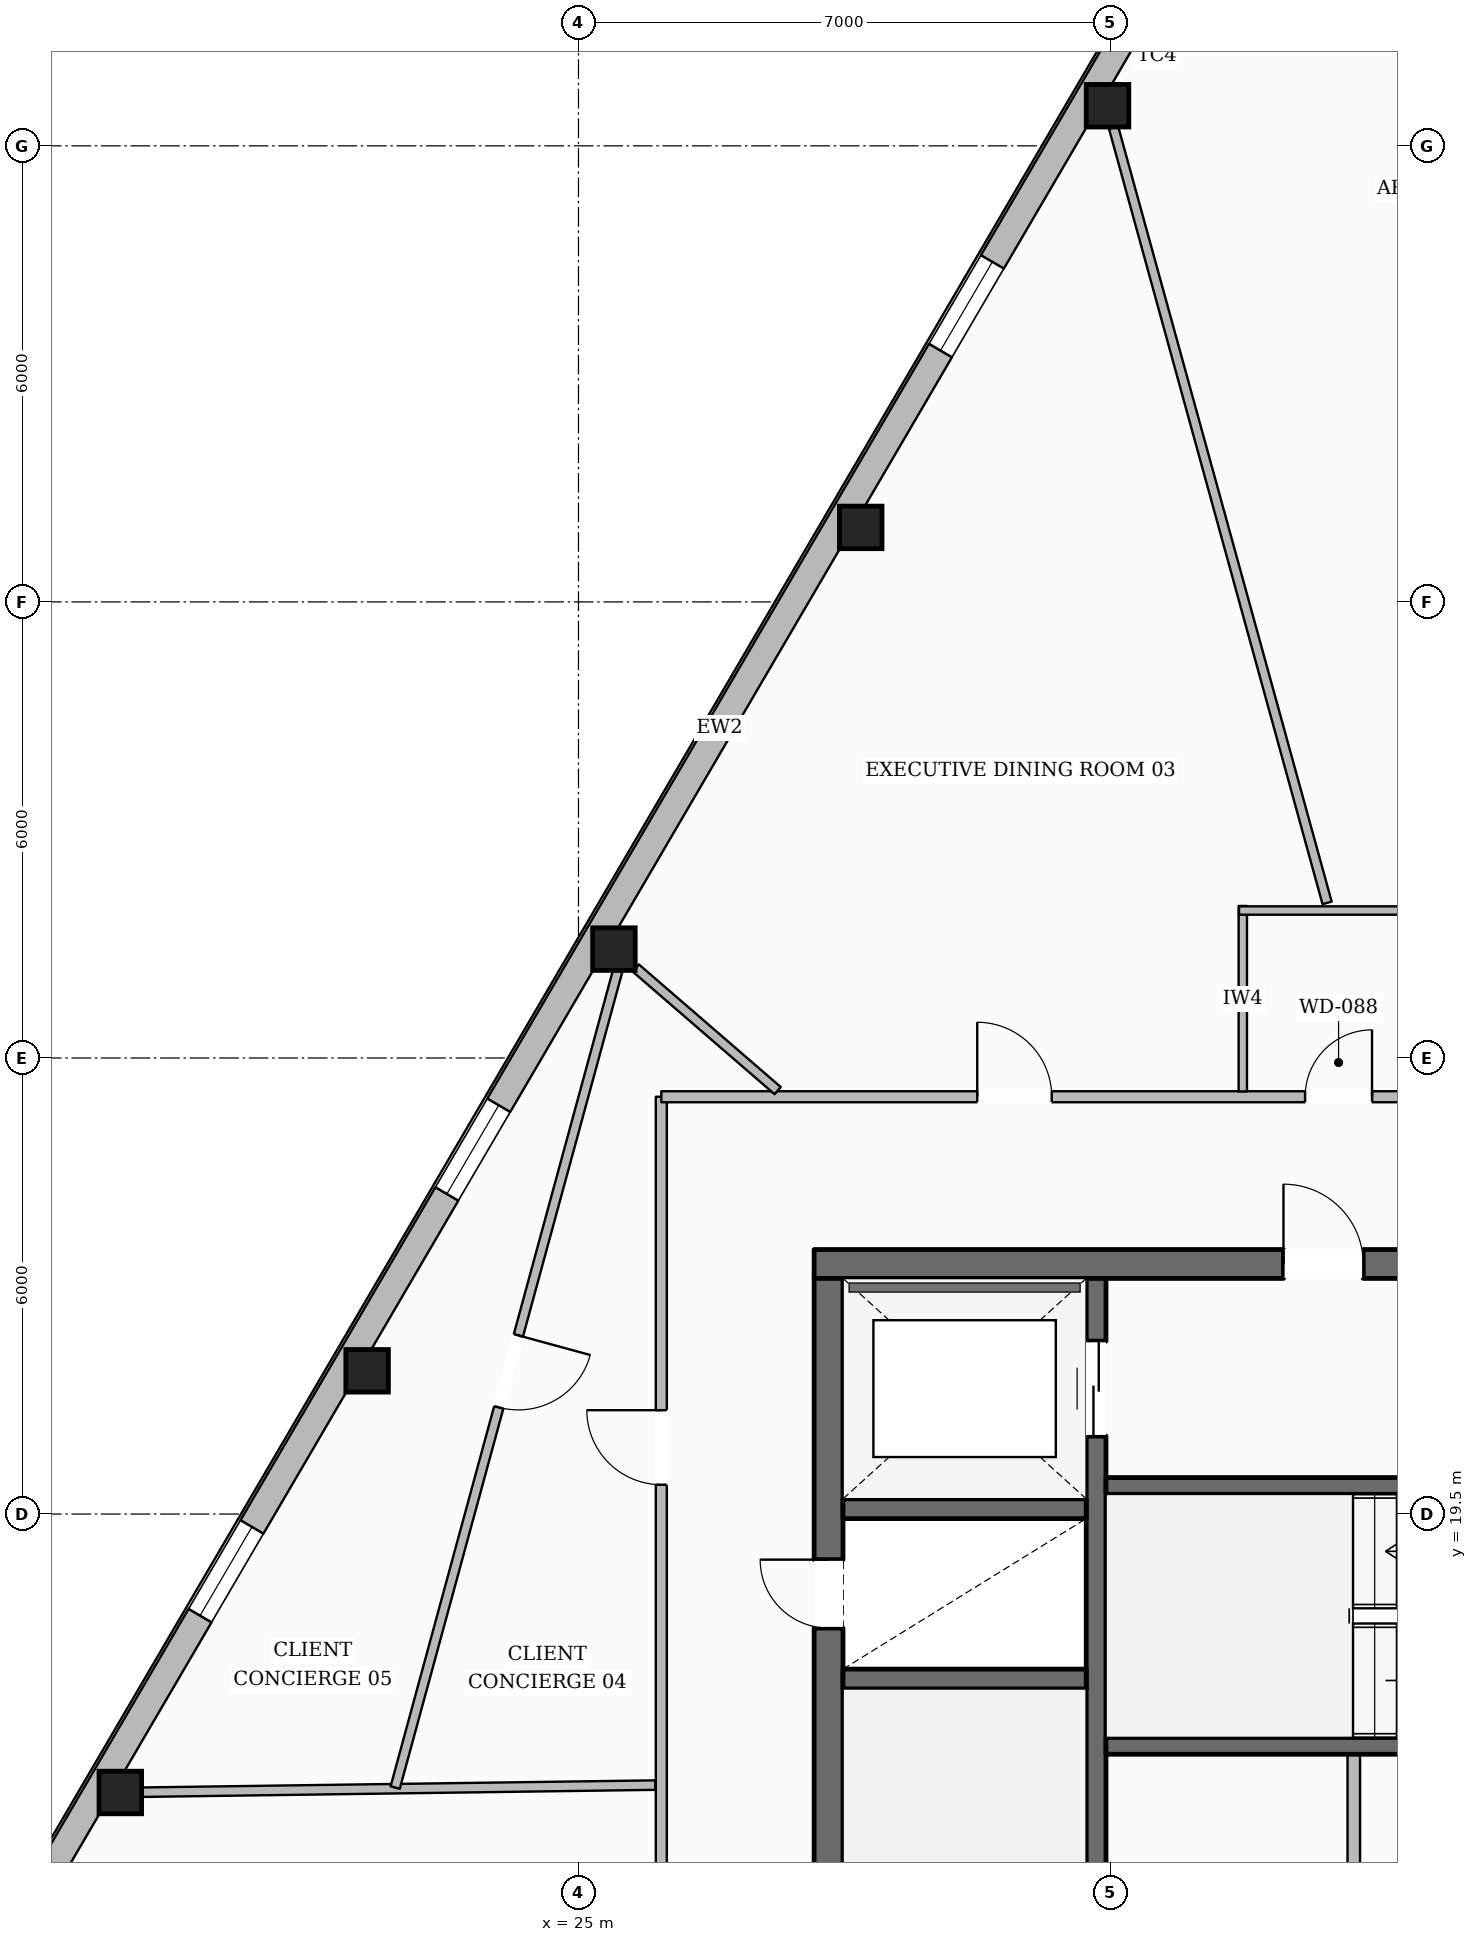
"""IFC4 building model, lengths in metres.
Left out: names, types, materials, properties, quantities, classifications, styles, units other than length and angle.
Written with IfcOpenShell. Run it as: python <this file> out.ifc"""

import sys

from ifc_helpers import new_model, si_unit, direction, frame, frame_2d, origin, origin_2d, place, context, subcontext, project, spatial, rectangle, hollow_rectangle, extrude, element, fill, save


model = new_model("IFC4")
c1 = context("Model", 3, precision=1e-05, world=origin(), true_north=direction((0.0, 1.0)))
c2 = subcontext(c1, "Body", "Model", "MODEL_VIEW")
j1 = project(units=[si_unit("LENGTHUNIT", "METRE"), si_unit("PLANEANGLEUNIT", "RADIAN")], contexts=[c1])
p1 = place(None, origin())
s1 = spatial("IfcSite", under=j1, at=p1, CompositionType="ELEMENT")
p2 = place(p1, origin())
s2 = spatial("IfcBuilding", under=s1, at=p2, CompositionType="ELEMENT")
p3 = place(p2, frame((0.0, 0.0, 289.55)))
s3 = spatial("IfcBuildingStorey", under=s2, at=p3, CompositionType="ELEMENT", Elevation=289.55)
p4 = place(p3, frame((28.1, 22.79, 0.0), z_axis=(0.0, 0.0, 1.0), x_axis=(1.0, 0.0, 0.0)))
e1 = element("IfcWall", 1, at=p4, inside=s3, PredefinedType="SOLIDWALL", context=c2, shape_type="SweptSolid", body=[
    extrude(rectangle(XDim=19.8, YDim=0.38, at=frame_2d((9.9, 0.0))), origin(), (0.0, 0.0, 1.0), 3.61),
])
p5 = place(p4, frame((6.175, 0.0, 0.0)))
e2 = element("IfcOpeningElement", 2, at=p5, cuts=e1, PredefinedType="OPENING", context=c2, shape_type="SweptSolid", body=[
    extrude(rectangle(XDim=1.05, YDim=2.15, at=frame_2d((0.525, 1.075))), frame((0.0, 0.2, 0.0), z_axis=(0.0, -1.0, 0.0), x_axis=(1.0, 0.0, 0.0)), (0.0, 0.0, 1.0), 0.4),
])
p6 = place(p4, frame((12.575, 0.0, 0.0)))
e3 = element("IfcOpeningElement", 3, at=p6, cuts=e1, PredefinedType="OPENING", context=c2, shape_type="SweptSolid", body=[
    extrude(rectangle(XDim=1.05, YDim=2.15, at=frame_2d((0.525, 1.075))), frame((0.0, 0.2, 0.0), z_axis=(0.0, -1.0, 0.0), x_axis=(1.0, 0.0, 0.0)), (0.0, 0.0, 1.0), 0.4),
])
p7 = place(p3, frame((28.29, 9.6, 0.0), z_axis=(0.0, 0.0, 1.0), x_axis=(0.0, 1.0, 0.0)))
e4 = element("IfcWall", 4, at=p7, inside=s3, PredefinedType="SOLIDWALL", context=c2, shape_type="SweptSolid", body=[
    extrude(rectangle(XDim=13.0, YDim=0.38, at=frame_2d((6.5, 0.0))), origin(), (0.0, 0.0, 1.0), 3.61),
])
p8 = place(p7, frame((0.2, 0.0, 0.0)))
e5 = element("IfcOpeningElement", 5, at=p8, cuts=e4, PredefinedType="OPENING", context=c2, shape_type="SweptSolid", body=[
    extrude(rectangle(XDim=1.1, YDim=2.15, at=frame_2d((0.55, 1.075))), frame((0.0, 0.2, 0.0), z_axis=(0.0, -1.0, 0.0), x_axis=(1.0, 0.0, 0.0)), (0.0, 0.0, 1.0), 0.4),
])
p9 = place(p7, frame((8.4, 0.0, 0.0)))
e6 = element("IfcOpeningElement", 6, at=p9, cuts=e4, PredefinedType="OPENING", context=c2, shape_type="SweptSolid", body=[
    extrude(rectangle(XDim=0.9, YDim=2.1, at=frame_2d((0.45, 1.05))), frame((0.0, 0.2, 0.0), z_axis=(0.0, -1.0, 0.0), x_axis=(1.0, 0.0, 0.0)), (0.0, 0.0, 1.0), 0.4),
])
p10 = place(p3, frame((31.81, 9.6, 0.0), z_axis=(0.0, 0.0, 1.0), x_axis=(0.0, 1.0, 0.0)))
e7 = element("IfcWall", 7, at=p10, inside=s3, PredefinedType="SHEAR", context=c2, shape_type="SweptSolid", body=[
    extrude(rectangle(XDim=13.0, YDim=0.26, at=frame_2d((6.5, 0.0))), origin(), (0.0, 0.0, 1.0), 3.61),
])
p11 = place(p10, frame((10.925, 0.0, 0.0)))
e8 = element("IfcOpeningElement", 8, at=p11, cuts=e7, PredefinedType="OPENING", context=c2, shape_type="SweptSolid", body=[
    extrude(rectangle(XDim=1.25, YDim=2.25, at=frame_2d((0.625, 1.125))), frame((0.0, 0.14, 0.0), z_axis=(0.0, -1.0, 0.0), x_axis=(1.0, 0.0, 0.0)), (0.0, 0.0, 1.0), 0.28),
])
for number, where, z_axis, x_axis in (
    (9, (28.48, 17.33, 0.0), (0.0, 0.0, 1.0), (1.0, 0.0, 0.0)),
    (10, (28.48, 19.57, 0.0), (0.0, 0.0, 1.0), (1.0, 0.0, 0.0)),
):
    element("IfcWall", number, at=place(p3, frame(where, z_axis=z_axis, x_axis=x_axis)), inside=s3, PredefinedType="SHEAR", context=c2, shape_type="SweptSolid", body=[
        extrude(rectangle(XDim=3.2, YDim=0.26, at=frame_2d((1.6, 0.0))), origin(), (0.0, 0.0, 1.0), 3.61),
    ])
p12 = place(p3, frame((31.94, 19.87, 0.0), z_axis=(0.0, 0.0, 1.0), x_axis=(1.0, 0.0, 0.0)))
e11 = element("IfcWall", 11, at=p12, inside=s3, PredefinedType="SOLIDWALL", context=c2, shape_type="SweptSolid", body=[
    extrude(rectangle(XDim=12.12, YDim=0.22, at=frame_2d((6.06, 0.0))), origin(), (0.0, 0.0, 1.0), 3.61),
])
p13 = place(p12, frame((6.3, 0.0, 0.0)))
e12 = element("IfcOpeningElement", 12, at=p13, cuts=e11, PredefinedType="OPENING", context=c2, shape_type="SweptSolid", body=[
    extrude(rectangle(XDim=1.1, YDim=2.15, at=frame_2d((0.55, 1.075))), frame((0.0, 0.12, 0.0), z_axis=(0.0, -1.0, 0.0), x_axis=(1.0, 0.0, 0.0)), (0.0, 0.0, 1.0), 0.24),
])
p14 = place(p12, frame((8.23, 0.0, 0.0)))
e13 = element("IfcOpeningElement", 13, at=p14, cuts=e11, PredefinedType="OPENING", context=c2, shape_type="SweptSolid", body=[
    extrude(rectangle(XDim=0.9, YDim=2.1, at=frame_2d((0.45, 1.05))), frame((0.0, 0.12, 0.0), z_axis=(0.0, -1.0, 0.0), x_axis=(1.0, 0.0, 0.0)), (0.0, 0.0, 1.0), 0.24),
])
p15 = place(p12, frame((10.45, 0.0, 0.0)))
e14 = element("IfcOpeningElement", 14, at=p15, cuts=e11, PredefinedType="OPENING", context=c2, shape_type="SweptSolid", body=[
    extrude(rectangle(XDim=0.9, YDim=2.1, at=frame_2d((0.45, 1.05))), frame((0.0, 0.12, 0.0), z_axis=(0.0, -1.0, 0.0), x_axis=(1.0, 0.0, 0.0)), (0.0, 0.0, 1.0), 0.24),
])
p16 = place(p3, frame((31.94, 16.45, 0.0), z_axis=(0.0, 0.0, 1.0), x_axis=(1.0, 0.0, 0.0)))
e15 = element("IfcWall", 15, at=p16, inside=s3, PredefinedType="SOLIDWALL", context=c2, shape_type="SweptSolid", body=[
    extrude(rectangle(XDim=12.12, YDim=0.22, at=frame_2d((6.06, 0.0))), origin(), (0.0, 0.0, 1.0), 3.61),
])
for number, where, z_axis, x_axis in (
    (16, (31.96, 38.028, 0.0), (0.0, 0.0, 1.0), (1.0, 0.0, 0.0)),
    (17, (28.713, 32.48, 0.0), (0.0, 0.0, 1.0), (1.0, 0.0, 0.0)),
    (18, (25.466, 26.932, 0.0), (0.0, 0.0, 1.0), (1.0, 0.0, 0.0)),
    (19, (22.219, 21.385, 0.0), (0.0, 0.0, 1.0), (1.0, 0.0, 0.0)),
    (20, (18.972, 15.837, 0.0), (0.0, 0.0, 1.0), (1.0, 0.0, 0.0)),
):
    element("IfcColumn", number, at=place(p3, frame(where, z_axis=z_axis, x_axis=x_axis)), inside=s3, PredefinedType="COLUMN", context=c2, shape_type="SweptSolid", body=[
        extrude(hollow_rectangle(XDim=0.56, YDim=0.56, WallThickness=0.025, at=origin_2d()), origin(), (0.0, 0.0, 1.0), 3.61),
    ])
p17 = place(p3, frame((15.251, 10.013, 0.0), z_axis=(0.0, 0.0, 1.0), x_axis=(0.505125442866, 0.863045935608, 0.0)))
e21 = element("IfcWall", 21, at=p17, inside=s3, PredefinedType="STANDARD", context=c2, shape_type="SweptSolid", body=[
    extrude(rectangle(XDim=39.517, YDim=0.35, at=frame_2d((19.759, 0.0))), origin(), (0.0, 0.0, 1.0), 3.196),
])
p18 = place(p17, frame((35.157, 0.0, 0.65)))
e22 = element("IfcOpeningElement", 22, at=p18, cuts=e21, PredefinedType="OPENING", context=c2, shape_type="SweptSolid", body=[
    extrude(rectangle(XDim=1.35, YDim=1.75, at=frame_2d((0.675, 0.875))), frame((0.0, 0.185, 0.0), z_axis=(0.0, -1.0, 0.0), x_axis=(1.0, 0.0, 0.0)), (0.0, 0.0, 1.0), 0.37),
])
p19 = place(p17, frame((28.729, 0.0, 0.65)))
e23 = element("IfcOpeningElement", 23, at=p19, cuts=e21, PredefinedType="OPENING", context=c2, shape_type="SweptSolid", body=[
    extrude(rectangle(XDim=1.35, YDim=1.75, at=frame_2d((0.675, 0.875))), frame((0.0, 0.185, 0.0), z_axis=(0.0, -1.0, 0.0), x_axis=(1.0, 0.0, 0.0)), (0.0, 0.0, 1.0), 0.37),
])
p20 = place(p17, frame((15.872, 0.0, 0.65)))
e24 = element("IfcOpeningElement", 24, at=p20, cuts=e21, PredefinedType="OPENING", context=c2, shape_type="SweptSolid", body=[
    extrude(rectangle(XDim=1.35, YDim=1.75, at=frame_2d((0.675, 0.875))), frame((0.0, 0.185, 0.0), z_axis=(0.0, -1.0, 0.0), x_axis=(1.0, 0.0, 0.0)), (0.0, 0.0, 1.0), 0.37),
])
p21 = place(p17, frame((9.444, 0.0, 0.65)))
e25 = element("IfcOpeningElement", 25, at=p21, cuts=e21, PredefinedType="OPENING", context=c2, shape_type="SweptSolid", body=[
    extrude(rectangle(XDim=1.35, YDim=1.75, at=frame_2d((0.675, 0.875))), frame((0.0, 0.185, 0.0), z_axis=(0.0, -1.0, 0.0), x_axis=(1.0, 0.0, 0.0)), (0.0, 0.0, 1.0), 0.37),
])
p22 = place(p17, frame((3.016, 0.0, 0.65)))
e26 = element("IfcOpeningElement", 26, at=p22, cuts=e21, PredefinedType="OPENING", context=c2, shape_type="SweptSolid", body=[
    extrude(rectangle(XDim=1.35, YDim=1.75, at=frame_2d((0.675, 0.875))), frame((0.0, 0.185, 0.0), z_axis=(0.0, -1.0, 0.0), x_axis=(1.0, 0.0, 0.0)), (0.0, 0.0, 1.0), 0.37),
])
p23 = place(p3, frame((35.2, 14.1, 0.0), z_axis=(0.0, 0.0, 1.0), x_axis=(0.0, 1.0, 0.0)))
e27 = element("IfcWall", 27, at=p23, inside=s3, PredefinedType="PARTITIONING", context=c2, shape_type="SweptSolid", body=[
    extrude(rectangle(XDim=2.24, YDim=0.165, at=frame_2d((1.12, 0.0))), origin(), (0.0, 0.0, 1.0), 3.61),
])
p24 = place(p3, frame((26.09, 7.21, 0.0), z_axis=(0.0, 0.0, 1.0), x_axis=(0.0, 1.0, 0.0)))
e28 = element("IfcWall", 28, at=p24, inside=s3, PredefinedType="PARTITIONING", context=c2, shape_type="SweptSolid", body=[
    extrude(rectangle(XDim=17.78, YDim=0.145, at=frame_2d((8.89, 0.0))), origin(), (0.0, 0.0, 1.0), 3.349),
])
p25 = place(p24, frame((12.676, 0.0, 0.0)))
e29 = element("IfcOpeningElement", 29, at=p25, cuts=e28, PredefinedType="OPENING", context=c2, shape_type="SweptSolid", body=[
    extrude(rectangle(XDim=0.98, YDim=2.15, at=frame_2d((0.49, 1.075))), frame((0.0, 0.083, 0.0), z_axis=(0.0, -1.0, 0.0), x_axis=(1.0, 0.0, 0.0)), (0.0, 0.0, 1.0), 0.165),
])
p26 = place(p24, frame((3.748, 0.0, 0.0)))
e30 = element("IfcOpeningElement", 30, at=p26, cuts=e28, PredefinedType="OPENING", context=c2, shape_type="SweptSolid", body=[
    extrude(rectangle(XDim=1.4, YDim=2.2, at=frame_2d((0.7, 1.1))), frame((0.0, 0.083, 0.0), z_axis=(0.0, -1.0, 0.0), x_axis=(1.0, 0.0, 0.0)), (0.0, 0.0, 1.0), 0.165),
])
p27 = place(p3, frame((26.09, 24.99, 0.0), z_axis=(0.0, 0.0, 1.0), x_axis=(1.0, 0.0, 0.0)))
e31 = element("IfcWall", 31, at=p27, inside=s3, PredefinedType="PARTITIONING", context=c2, shape_type="SweptSolid", body=[
    extrude(rectangle(XDim=17.11, YDim=0.145, at=frame_2d((8.555, 0.0))), origin(), (0.0, 0.0, 1.0), 3.61),
])
p28 = place(p27, frame((8.47, 0.0, 0.0)))
e32 = element("IfcOpeningElement", 32, at=p28, cuts=e31, PredefinedType="OPENING", context=c2, shape_type="SweptSolid", body=[
    extrude(rectangle(XDim=0.88, YDim=2.1, at=frame_2d((0.44, 1.05))), frame((0.0, 0.083, 0.0), z_axis=(0.0, -1.0, 0.0), x_axis=(1.0, 0.0, 0.0)), (0.0, 0.0, 1.0), 0.165),
])
p29 = place(p27, frame((10.99, 0.0, 0.0)))
e33 = element("IfcOpeningElement", 33, at=p29, cuts=e31, PredefinedType="OPENING", context=c2, shape_type="SweptSolid", body=[
    extrude(rectangle(XDim=0.88, YDim=2.1, at=frame_2d((0.44, 1.05))), frame((0.0, 0.083, 0.0), z_axis=(0.0, -1.0, 0.0), x_axis=(1.0, 0.0, 0.0)), (0.0, 0.0, 1.0), 0.165),
])
p30 = place(p27, frame((13.37, 0.0, 0.0)))
e34 = element("IfcOpeningElement", 34, at=p30, cuts=e31, PredefinedType="OPENING", context=c2, shape_type="SweptSolid", body=[
    extrude(rectangle(XDim=0.96, YDim=2.1, at=frame_2d((0.48, 1.05))), frame((0.0, 0.083, 0.0), z_axis=(0.0, -1.0, 0.0), x_axis=(1.0, 0.0, 0.0)), (0.0, 0.0, 1.0), 0.165),
])
p31 = place(p27, frame((4.156, 0.0, 0.0)))
e35 = element("IfcOpeningElement", 35, at=p31, cuts=e31, PredefinedType="OPENING", context=c2, shape_type="SweptSolid", body=[
    extrude(rectangle(XDim=0.98, YDim=2.15, at=frame_2d((0.49, 1.075))), frame((0.0, 0.083, 0.0), z_axis=(0.0, -1.0, 0.0), x_axis=(1.0, 0.0, 0.0)), (0.0, 0.0, 1.0), 0.165),
])
p32 = place(p3, frame((33.74, 25.06, 0.0), z_axis=(0.0, 0.0, 1.0), x_axis=(0.0, 1.0, 0.0)))
e36 = element("IfcWall", 36, at=p32, inside=s3, PredefinedType="PLUMBINGWALL", context=c2, shape_type="SweptSolid", body=[
    extrude(rectangle(XDim=2.44, YDim=0.11, at=frame_2d((1.22, 0.0))), origin(), (0.0, 0.0, 1.0), 3.61),
])
p33 = place(p3, frame((33.69, 27.44, 0.0), z_axis=(0.0, 0.0, 1.0), x_axis=(1.0, 0.0, 0.0)))
e37 = element("IfcWall", 37, at=p33, inside=s3, PredefinedType="PLUMBINGWALL", context=c2, shape_type="SweptSolid", body=[
    extrude(rectangle(XDim=7.46, YDim=0.11, at=frame_2d((3.73, 0.0))), origin(), (0.0, 0.0, 1.0), 3.61),
])
p34 = place(p3, frame((34.849, 27.54, 0.0), z_axis=(0.0, 0.0, 1.0), x_axis=(-0.265543710565, 0.964098821584, 0.0)))
e38 = element("IfcWall", 38, at=p34, inside=s3, PredefinedType="PARTITIONING", context=c2, shape_type="SweptSolid", body=[
    extrude(rectangle(XDim=10.58, YDim=0.125, at=frame_2d((5.29, 0.0))), origin(), (0.0, 0.0, 1.0), 3.61),
])
p35 = place(p3, frame((27.621, 25.071, 0.0), z_axis=(0.0, 0.0, 1.0), x_axis=(-0.75660930935, 0.653867228881, 0.0)))
e39 = element("IfcWall", 39, at=p35, inside=s3, PredefinedType="PARTITIONING", context=c2, shape_type="SweptSolid", body=[
    extrude(rectangle(XDim=2.467, YDim=0.125, at=frame_2d((1.233, 0.0))), origin(), (0.0, 0.0, 1.0), 3.61),
])
p36 = place(p3, frame((26.01, 15.934, 0.0), z_axis=(0.0, 0.0, 1.0), x_axis=(-0.999904544413, -0.01381673127, 0.0)))
e40 = element("IfcWall", 40, at=p36, inside=s3, PredefinedType="PARTITIONING", context=c2, shape_type="SweptSolid", body=[
    extrude(rectangle(XDim=6.75, YDim=0.125, at=frame_2d((3.375, 0.0))), origin(), (0.0, 0.0, 1.0), 3.246),
])
p37 = place(p3, frame((25.515, 26.644, 0.0), z_axis=(0.0, 0.0, 1.0), x_axis=(-0.262861356166, -0.964833616451, 0.0)))
e41 = element("IfcWall", 41, at=p37, inside=s3, PredefinedType="PARTITIONING", context=c2, shape_type="SweptSolid", body=[
    extrude(rectangle(XDim=11.134, YDim=0.125, at=frame_2d((5.567, 0.0))), origin(), (0.0, 0.0, 1.0), 3.349),
])
p38 = place(p37, frame((4.969, 0.0, 0.0)))
e42 = element("IfcOpeningElement", 42, at=p38, cuts=e41, PredefinedType="OPENING", context=c2, shape_type="SweptSolid", body=[
    extrude(rectangle(XDim=0.98, YDim=2.15, at=frame_2d((0.49, 1.075))), frame((0.0, 0.073, 0.0), z_axis=(0.0, -1.0, 0.0), x_axis=(1.0, 0.0, 0.0)), (0.0, 0.0, 1.0), 0.145),
])
p39 = place(p19, origin())
e43 = element("IfcWindow", 43, at=p39, inside=s3, PartitioningType="SINGLE_PANEL", PredefinedType="WINDOW", context=c2, shape_type="SweptSolid", body=[
    extrude(rectangle(XDim=1.35, YDim=1.75, at=frame_2d((0.675, 0.875))), frame((0.0, 0.03, 0.0), z_axis=(0.0, -1.0, 0.0), x_axis=(1.0, 0.0, 0.0)), (0.0, 0.0, 1.0), 0.06),
])
fill(e23, e43)
p40 = place(p20, origin())
e44 = element("IfcWindow", 44, at=p40, inside=s3, PartitioningType="SINGLE_PANEL", PredefinedType="WINDOW", context=c2, shape_type="SweptSolid", body=[
    extrude(rectangle(XDim=1.35, YDim=1.75, at=frame_2d((0.675, 0.875))), frame((0.0, 0.03, 0.0), z_axis=(0.0, -1.0, 0.0), x_axis=(1.0, 0.0, 0.0)), (0.0, 0.0, 1.0), 0.06),
])
fill(e24, e44)
p41 = place(p21, origin())
e45 = element("IfcWindow", 45, at=p41, inside=s3, PartitioningType="SINGLE_PANEL", PredefinedType="WINDOW", context=c2, shape_type="SweptSolid", body=[
    extrude(rectangle(XDim=1.35, YDim=1.75, at=frame_2d((0.675, 0.875))), frame((0.0, 0.03, 0.0), z_axis=(0.0, -1.0, 0.0), x_axis=(1.0, 0.0, 0.0)), (0.0, 0.0, 1.0), 0.06),
])
fill(e25, e45)
p42 = place(p9, origin())
e46 = element("IfcDoor", 46, at=p42, inside=s3, OperationType="SINGLE_SWING_RIGHT", PredefinedType="DOOR", context=c2, shape_type="SweptSolid", body=[
    extrude(rectangle(XDim=0.9, YDim=2.1, at=frame_2d((0.45, 1.05))), frame((0.0, 0.025, 0.0), z_axis=(0.0, -1.0, 0.0), x_axis=(1.0, 0.0, 0.0)), (0.0, 0.0, 1.0), 0.05),
])
fill(e6, e46)
p43 = place(p5, origin())
e47 = element("IfcDoor", 47, at=p43, inside=s3, OperationType="SINGLE_SWING_LEFT", PredefinedType="DOOR", context=c2, shape_type="SweptSolid", body=[
    extrude(rectangle(XDim=1.05, YDim=2.15, at=frame_2d((0.525, 1.075))), frame((0.0, 0.025, 0.0), z_axis=(0.0, -1.0, 0.0), x_axis=(1.0, 0.0, 0.0)), (0.0, 0.0, 1.0), 0.05),
])
fill(e2, e47)
p44 = place(p11, origin())
e48 = element("IfcDoor", 48, at=p44, inside=s3, OperationType="DOUBLE_DOOR_SLIDING", PredefinedType="DOOR", context=c2, shape_type="SweptSolid", body=[
    extrude(rectangle(XDim=1.25, YDim=2.25, at=frame_2d((0.625, 1.125))), frame((0.0, 0.025, 0.0), z_axis=(0.0, -1.0, 0.0), x_axis=(1.0, 0.0, 0.0)), (0.0, 0.0, 1.0), 0.05),
])
fill(e8, e48)
p45 = place(p28, origin())
e49 = element("IfcDoor", 49, at=p45, inside=s3, OperationType="SINGLE_SWING_RIGHT", PredefinedType="DOOR", context=c2, shape_type="SweptSolid", body=[
    extrude(rectangle(XDim=0.88, YDim=2.1, at=frame_2d((0.44, 1.05))), frame((0.0, 0.025, 0.0), z_axis=(0.0, -1.0, 0.0), x_axis=(1.0, 0.0, 0.0)), (0.0, 0.0, 1.0), 0.05),
])
fill(e32, e49)
p46 = place(p31, origin())
e50 = element("IfcDoor", 50, at=p46, inside=s3, OperationType="SINGLE_SWING_LEFT", PredefinedType="DOOR", context=c2, shape_type="SweptSolid", body=[
    extrude(rectangle(XDim=0.98, YDim=2.15, at=frame_2d((0.49, 1.075))), frame((0.0, 0.025, 0.0), z_axis=(0.0, -1.0, 0.0), x_axis=(1.0, 0.0, 0.0)), (0.0, 0.0, 1.0), 0.05),
])
fill(e35, e50)
p47 = place(p25, origin())
e51 = element("IfcDoor", 51, at=p47, inside=s3, OperationType="SINGLE_SWING_RIGHT", PredefinedType="DOOR", context=c2, shape_type="SweptSolid", body=[
    extrude(rectangle(XDim=0.98, YDim=2.15, at=frame_2d((0.49, 1.075))), frame((0.0, 0.025, 0.0), z_axis=(0.0, -1.0, 0.0), x_axis=(1.0, 0.0, 0.0)), (0.0, 0.0, 1.0), 0.05),
])
fill(e29, e51)
p48 = place(p38, origin())
e52 = element("IfcDoor", 52, at=p48, inside=s3, OperationType="SINGLE_SWING_LEFT", PredefinedType="DOOR", context=c2, shape_type="SweptSolid", body=[
    extrude(rectangle(XDim=0.98, YDim=2.15, at=frame_2d((0.49, 1.075))), frame((0.0, 0.025, 0.0), z_axis=(0.0, -1.0, 0.0), x_axis=(1.0, 0.0, 0.0)), (0.0, 0.0, 1.0), 0.05),
])
fill(e42, e52)
save(model, sys.argv[1])
